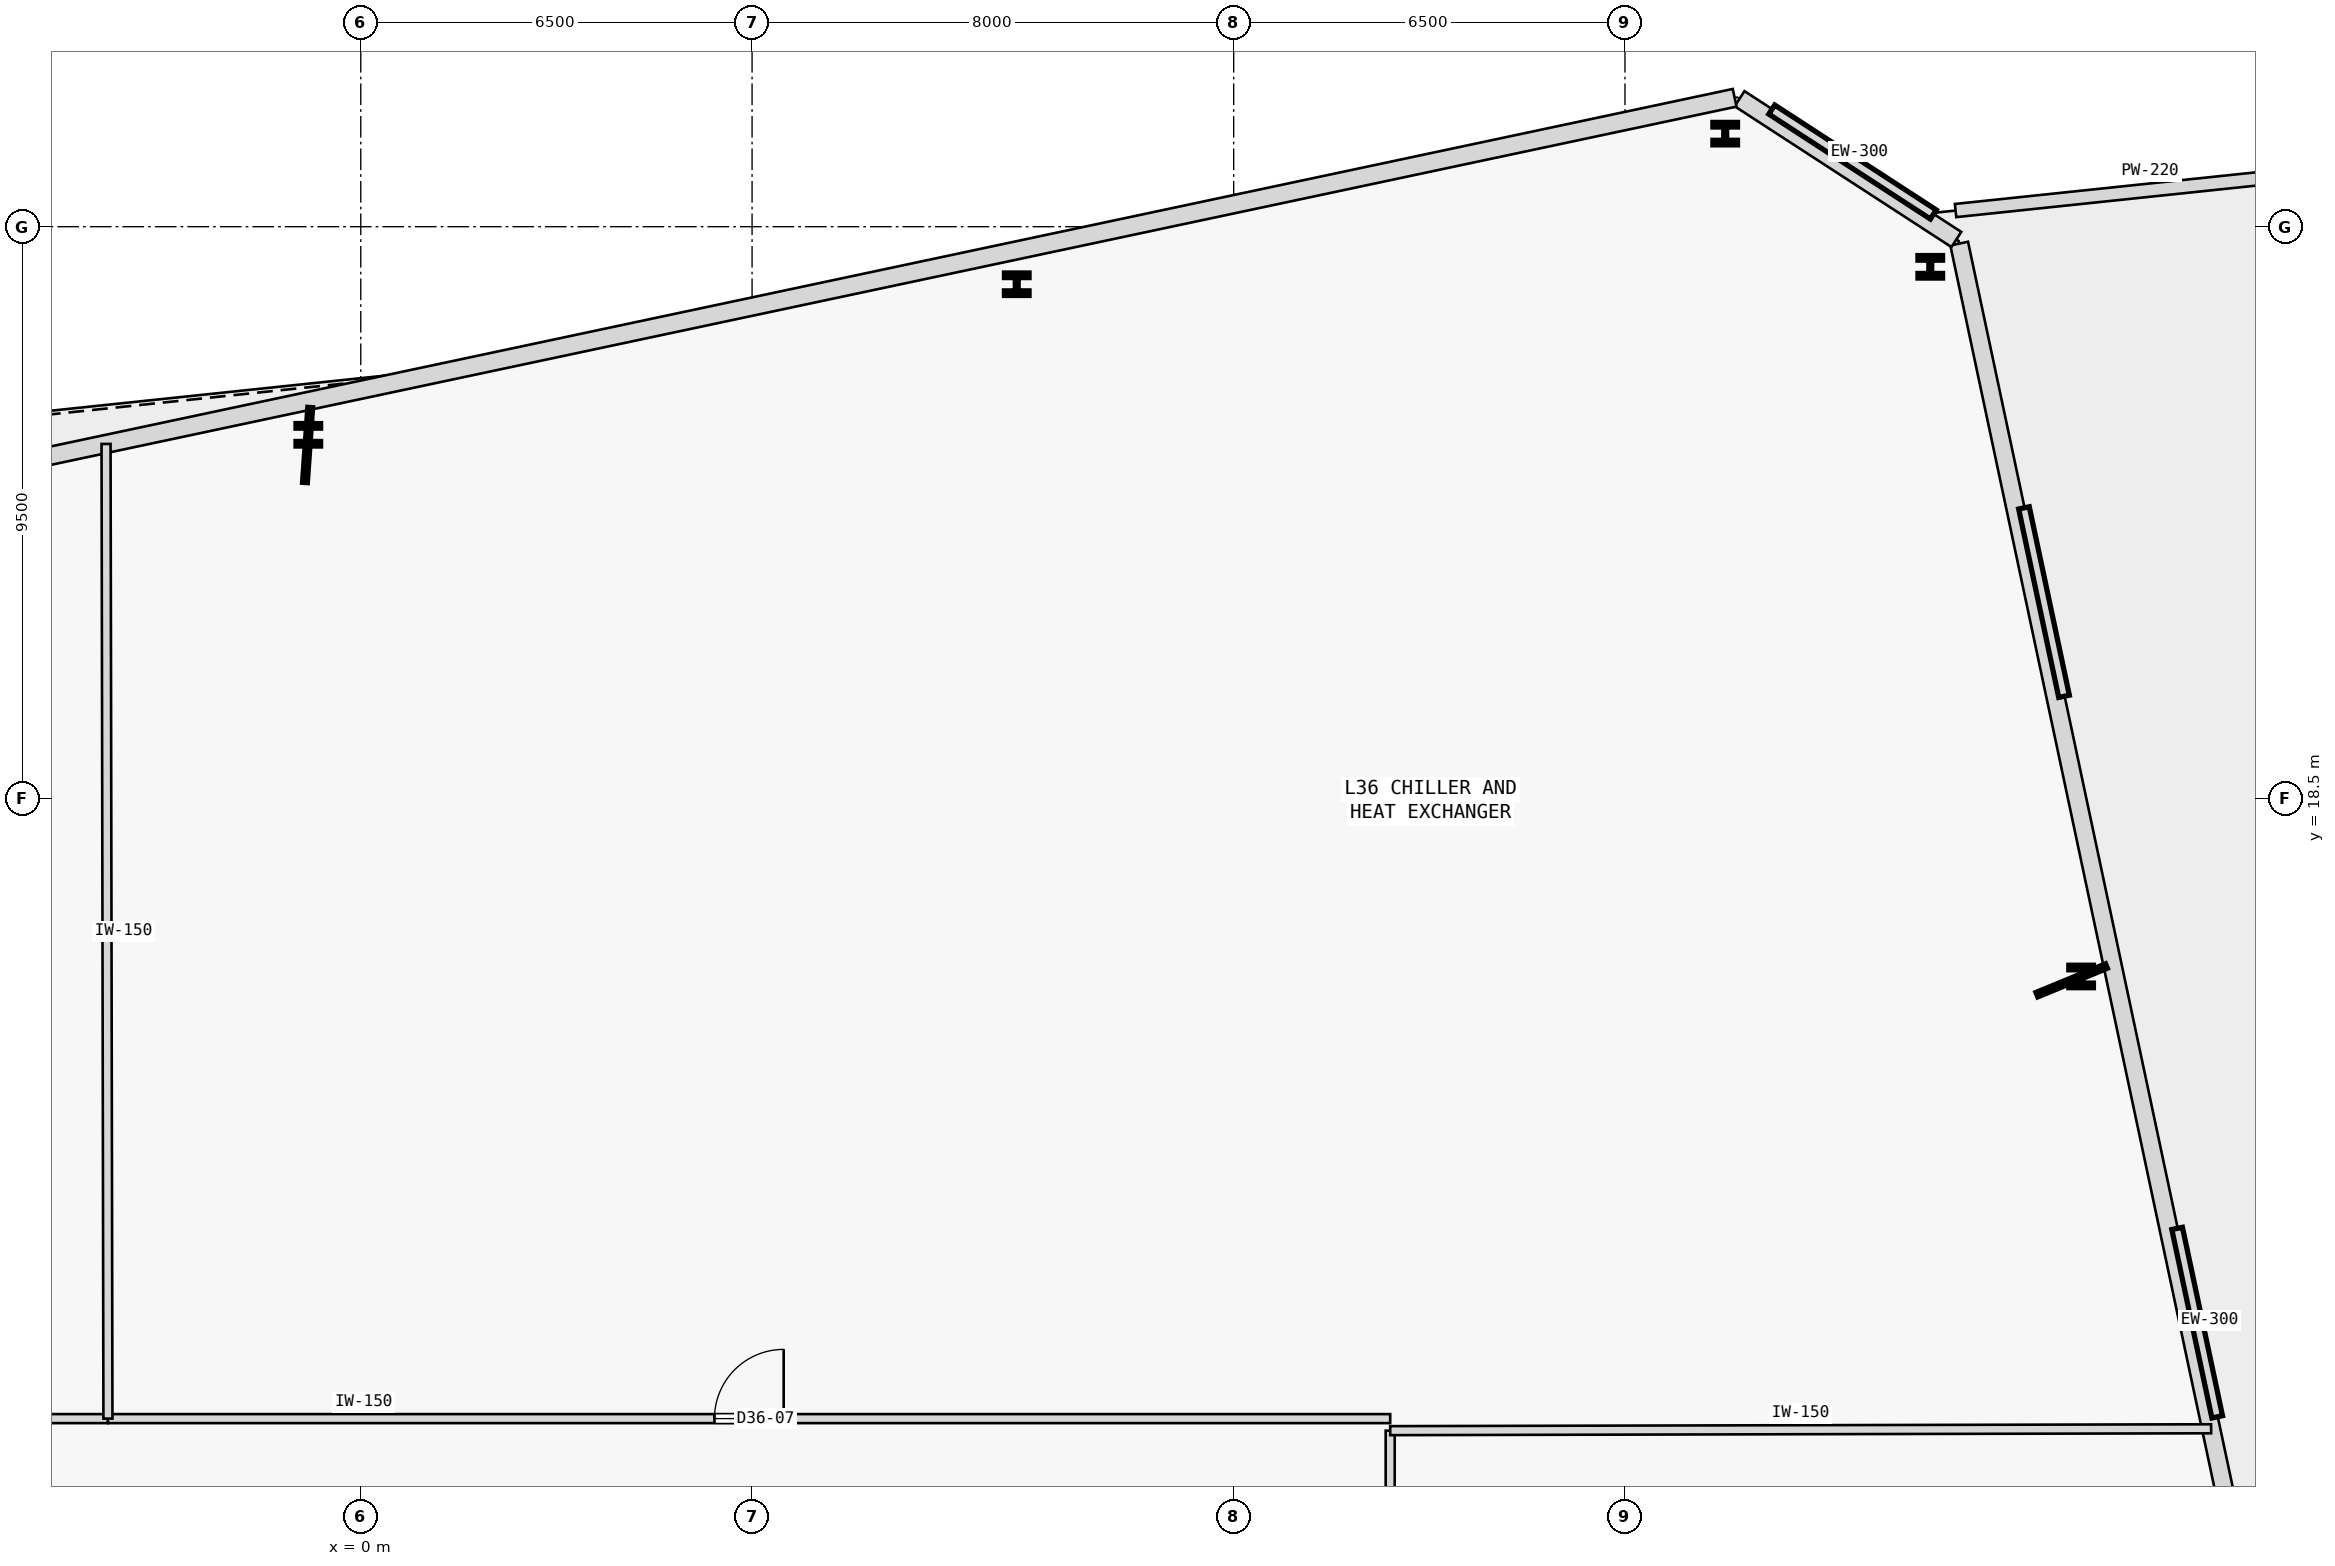
"""IFC4 building model, lengths in metres.
Left out: names, types, materials, properties, quantities, classifications, styles, units other than length and angle.
Written with IfcOpenShell. Run it as: python <this file> out.ifc"""

import sys

from ifc_helpers import new_model, si_unit, direction, frame, frame_2d, origin, origin_2d, place, context, subcontext, project, spatial, rectangle, i_section, extrude, element, fill, save


model = new_model("IFC4")
c1 = context("Model", 3, precision=1e-05, world=origin(), true_north=direction((0.0, 1.0)))
c2 = subcontext(c1, "Body", "Model", "MODEL_VIEW")
j1 = project(units=[si_unit("LENGTHUNIT", "METRE"), si_unit("PLANEANGLEUNIT", "RADIAN")], contexts=[c1])
p1 = place(None, origin())
s1 = spatial("IfcSite", under=j1, at=p1, CompositionType="ELEMENT")
p2 = place(p1, origin())
s2 = spatial("IfcBuilding", under=s1, at=p2, CompositionType="ELEMENT")
p3 = place(p2, frame((0.0, 0.0, 142.9)))
s3 = spatial("IfcBuildingStorey", under=s2, at=p3, CompositionType="ELEMENT", Elevation=142.9)
for number, where, z_axis, x_axis in (
    (1, (28.577, 15.545, 0.0), (0.0, 0.0, 1.0), (1.0, 0.0, 0.0)),
    (2, (26.071, 27.333, 0.0), (0.0, 0.0, 1.0), (1.0, 0.0, 0.0)),
    (3, (22.665, 29.546, 0.0), (0.0, 0.0, 1.0), (1.0, 0.0, 0.0)),
    (4, (10.896, 27.044, 0.0), (0.0, 0.0, 1.0), (1.0, 0.0, 0.0)),
    (5, (-0.872, 24.543, 0.0), (0.0, 0.0, 1.0), (1.0, 0.0, 0.0)),
):
    element("IfcColumn", number, at=place(p3, frame(where, z_axis=z_axis, x_axis=x_axis)), inside=s3, PredefinedType="COLUMN", context=c2, shape_type="SweptSolid", body=[
        extrude(i_section(OverallWidth=0.409, OverallDepth=0.374, WebThickness=0.048, FlangeThickness=0.077, FilletRadius=0.015, at=origin_2d()), origin(), (0.0, 0.0, 1.0), 4.4),
    ])
p4 = place(p3, frame((33.019, 28.954, 0.0), z_axis=(0.0, 0.0, 1.0), x_axis=(-0.994525613838, -0.104493078334, 0.0)))
e6 = element("IfcWall", 6, at=p4, inside=s3, PredefinedType="PARAPET", context=c2, shape_type="SweptSolid", body=[
    extrude(rectangle(XDim=6.563, YDim=0.22, at=frame_2d((3.281, 0.0))), origin(), (0.0, 0.0, 1.0), 1.2),
])
p5 = place(p3, frame((34.184, -8.189, 0.0), z_axis=(0.0, 0.0, 1.0), x_axis=(-0.207907831433, 0.978148421063, 0.0)))
e7 = element("IfcWall", 7, at=p5, inside=s3, PredefinedType="STANDARD", context=c2, shape_type="SweptSolid", body=[
    extrude(rectangle(XDim=36.71, YDim=0.3, at=frame_2d((18.355, 0.0))), origin(), (0.0, 0.0, 1.0), 4.15),
])
p6 = place(p3, frame((26.505, 27.788, 0.0), z_axis=(0.0, 0.0, 1.0), x_axis=(-0.838681252121, 0.544622582474, 0.0)))
e8 = element("IfcWall", 8, at=p6, inside=s3, PredefinedType="STANDARD", context=c2, shape_type="SweptSolid", body=[
    extrude(rectangle(XDim=4.294, YDim=0.3, at=frame_2d((2.147, 0.0))), origin(), (0.0, 0.0, 1.0), 4.15),
])
p7 = place(p3, frame((22.822, 30.141, 0.0), z_axis=(0.0, 0.0, 1.0), x_axis=(-0.978147586603, -0.207911757299, 0.0)))
e9 = element("IfcWall", 9, at=p7, inside=s3, PredefinedType="STANDARD", context=c2, shape_type="SweptSolid", body=[
    extrude(rectangle(XDim=60.71, YDim=0.3, at=frame_2d((30.355, 0.0))), origin(), (0.0, 0.0, 1.0), 4.15),
])
p8 = place(p7, frame((33.618, 0.0, 0.0)))
e10 = element("IfcOpeningElement", 10, at=p8, cuts=e9, PredefinedType="OPENING", context=c2, shape_type="SweptSolid", body=[
    extrude(rectangle(XDim=1.1, YDim=2.2, at=frame_2d((0.55, 1.1))), frame((0.0, 0.16, 0.0), z_axis=(0.0, -1.0, 0.0), x_axis=(1.0, 0.0, 0.0)), (0.0, 0.0, 1.0), 0.32),
])
p9 = place(p3, frame((-17.0, 8.2, 0.0), z_axis=(0.0, 0.0, 1.0), x_axis=(1.0, 0.0, 0.0)))
e11 = element("IfcWall", 11, at=p9, inside=s3, PredefinedType="PARTITIONING", context=c2, shape_type="SweptSolid", body=[
    extrude(rectangle(XDim=12.8, YDim=0.15, at=frame_2d((6.4, 0.0))), origin(), (0.0, 0.0, 1.0), 4.15),
])
p10 = place(p9, frame((5.825, 0.0, 0.0)))
e12 = element("IfcOpeningElement", 12, at=p10, cuts=e11, PredefinedType="OPENING", context=c2, shape_type="SweptSolid", body=[
    extrude(rectangle(XDim=1.15, YDim=2.15, at=frame_2d((0.575, 1.075))), frame((0.0, 0.085, 0.0), z_axis=(0.0, -1.0, 0.0), x_axis=(1.0, 0.0, 0.0)), (0.0, 0.0, 1.0), 0.17),
])
p11 = place(p3, frame((-4.2, 8.2, 0.0), z_axis=(0.0, 0.0, 1.0), x_axis=(1.0, 0.0, 0.0)))
e13 = element("IfcWall", 13, at=p11, inside=s3, PredefinedType="PARTITIONING", context=c2, shape_type="SweptSolid", body=[
    extrude(rectangle(XDim=21.3, YDim=0.15, at=frame_2d((10.65, 0.0))), origin(), (0.0, 0.0, 1.0), 4.15),
])
p12 = place(p11, frame((10.075, 0.0, 0.0)))
e14 = element("IfcOpeningElement", 14, at=p12, cuts=e13, PredefinedType="OPENING", context=c2, shape_type="SweptSolid", body=[
    extrude(rectangle(XDim=1.15, YDim=2.15, at=frame_2d((0.575, 1.075))), frame((0.0, 0.085, 0.0), z_axis=(0.0, -1.0, 0.0), x_axis=(1.0, 0.0, 0.0)), (0.0, 0.0, 1.0), 0.17),
])
p13 = place(p3, frame((17.1, -8.0, 0.0), z_axis=(0.0, 0.0, 1.0), x_axis=(0.0, 1.0, 0.0)))
e15 = element("IfcWall", 15, at=p13, inside=s3, PredefinedType="PARTITIONING", context=c2, shape_type="SweptSolid", body=[
    extrude(rectangle(XDim=16.0, YDim=0.15, at=frame_2d((8.0, 0.0))), origin(), (0.0, 0.0, 1.0), 4.15),
])
p14 = place(p13, frame((5.025, 0.0, 0.0)))
e16 = element("IfcOpeningElement", 16, at=p14, cuts=e15, PredefinedType="OPENING", context=c2, shape_type="SweptSolid", body=[
    extrude(rectangle(XDim=1.15, YDim=2.15, at=frame_2d((0.575, 1.075))), frame((0.0, 0.085, 0.0), z_axis=(0.0, -1.0, 0.0), x_axis=(1.0, 0.0, 0.0)), (0.0, 0.0, 1.0), 0.17),
])
p15 = place(p3, frame((-4.2, 8.2, 0.0), z_axis=(0.0, 0.0, 1.0), x_axis=(-0.001930061696, 0.999998137429, 0.0)))
e17 = element("IfcWall", 17, at=p15, inside=s3, PredefinedType="PARTITIONING", context=c2, shape_type="SweptSolid", body=[
    extrude(rectangle(XDim=16.191, YDim=0.15, at=frame_2d((8.096, 0.0))), origin(), (0.0, 0.0, 1.0), 4.15),
])
p16 = place(p3, frame((17.1, 8.0, 0.0), z_axis=(0.0, 0.0, 1.0), x_axis=(0.999997415053, 0.00227373864, 0.0)))
e18 = element("IfcWall", 18, at=p16, inside=s3, PredefinedType="PARTITIONING", context=c2, shape_type="SweptSolid", body=[
    extrude(rectangle(XDim=13.636, YDim=0.15, at=frame_2d((6.818, 0.0))), origin(), (0.0, 0.0, 1.0), 4.15),
])
p17 = place(p12, origin())
e19 = element("IfcDoor", 19, at=p17, inside=s3, OperationType="SINGLE_SWING_RIGHT", PredefinedType="DOOR", context=c2, shape_type="SweptSolid", body=[
    extrude(rectangle(XDim=1.15, YDim=2.15, at=frame_2d((0.575, 1.075))), frame((0.0, 0.025, 0.0), z_axis=(0.0, -1.0, 0.0), x_axis=(1.0, 0.0, 0.0)), (0.0, 0.0, 1.0), 0.05),
])
fill(e14, e19)
save(model, sys.argv[1])
